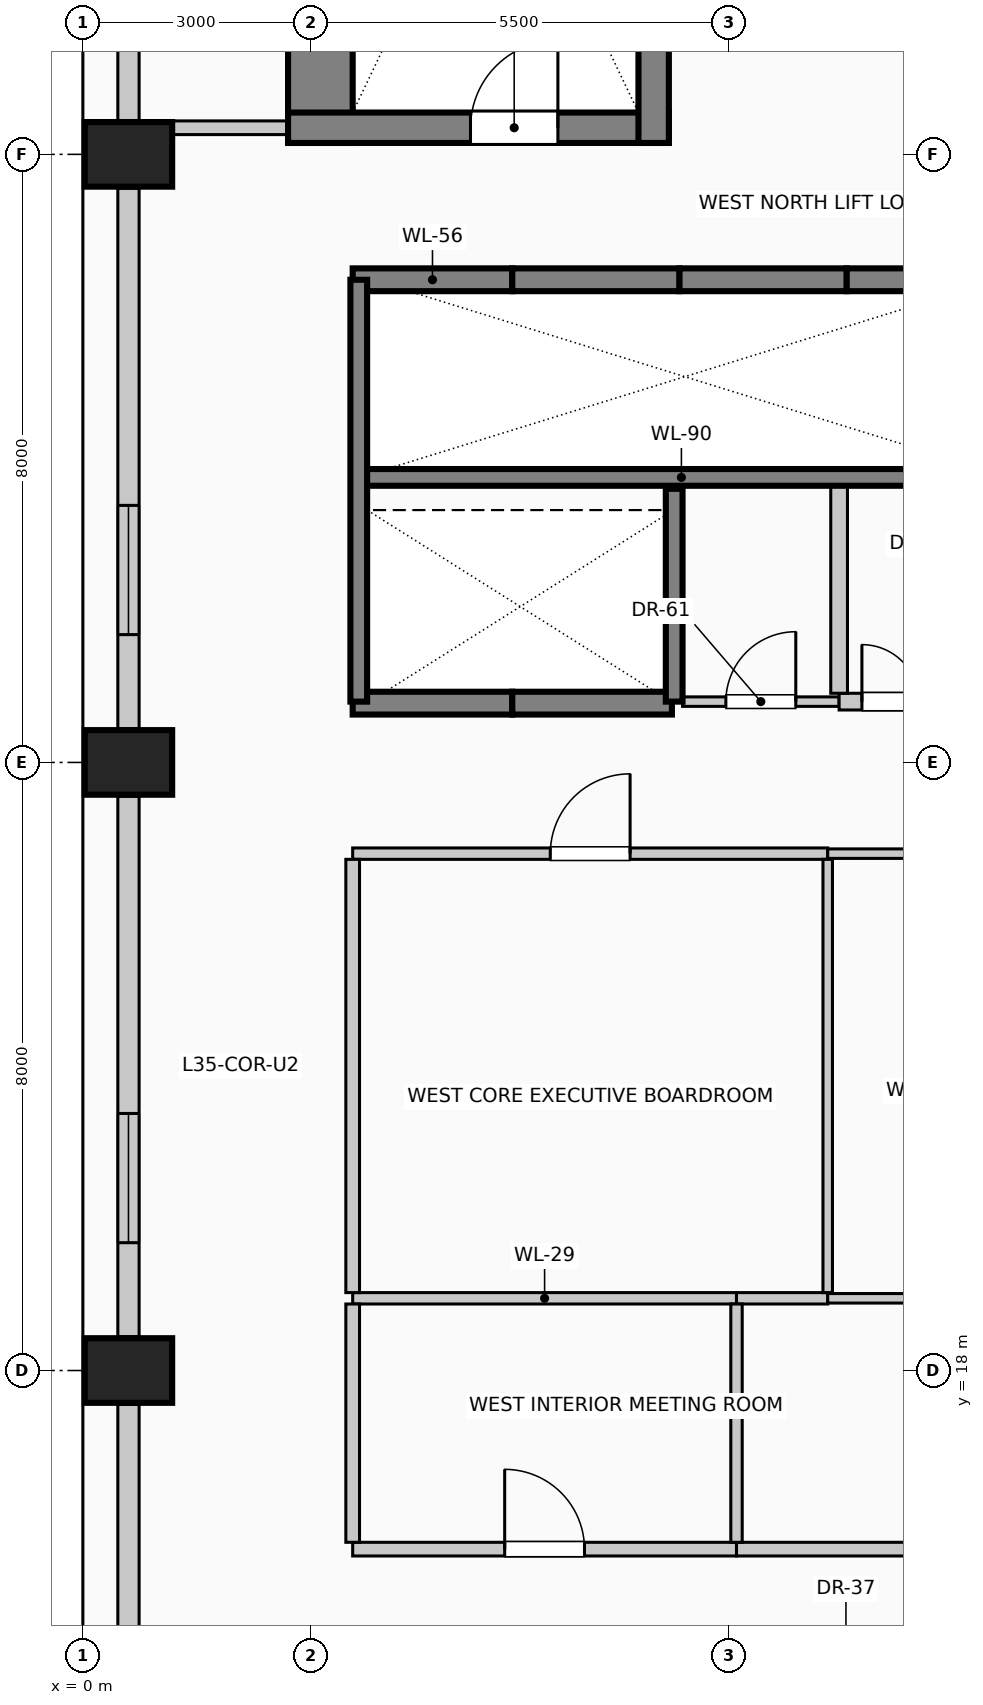
"""IFC4 building model, lengths in metres.
Left out: names, types, materials, properties, quantities, classifications, styles, units other than length and angle.
Written with IfcOpenShell. Run it as: python <this file> out.ifc"""

import sys

from ifc_helpers import new_model, si_unit, direction, frame, frame_2d, origin, origin_2d, place, context, subcontext, project, spatial, rectangle, extrude, element, fill, save


model = new_model("IFC4")
c1 = context("Model", 3, precision=1e-05, world=origin(), true_north=direction((0.0, 1.0)))
c2 = subcontext(c1, "Body", "Model", "MODEL_VIEW")
j1 = project(units=[si_unit("LENGTHUNIT", "METRE"), si_unit("PLANEANGLEUNIT", "RADIAN")], contexts=[c1])
p1 = place(None, origin())
s1 = spatial("IfcSite", under=j1, at=p1, CompositionType="ELEMENT")
p2 = place(p1, origin())
s2 = spatial("IfcBuilding", under=s1, at=p2, CompositionType="ELEMENT")
p3 = place(p2, frame((0.0, 0.0, 144.6)))
s3 = spatial("IfcBuildingStorey", under=s2, at=p3, CompositionType="ELEMENT", Elevation=144.6)
p4 = place(p3, frame((3.125, 34.15, 0.0), z_axis=(0.0, 0.0, 1.0), x_axis=(0.0, 1.0, 0.0)))
e1 = element("IfcWall", 1, at=p4, inside=s3, PredefinedType="SHEAR", context=c2, shape_type="SweptSolid", body=[
    extrude(rectangle(XDim=9.13, YDim=0.85, at=frame_2d((4.565, 0.0))), origin(), (0.0, 0.0, 1.0), 4.0),
])
p5 = place(p3, frame((2.7, 34.35, 0.0), z_axis=(0.0, 0.0, 1.0), x_axis=(1.0, 0.0, 0.0)))
e2 = element("IfcWall", 2, at=p5, inside=s3, PredefinedType="SHEAR", context=c2, shape_type="SweptSolid", body=[
    extrude(rectangle(XDim=5.01, YDim=0.4, at=frame_2d((2.505, 0.0))), origin(), (0.0, 0.0, 1.0), 4.0),
])
p6 = place(p5, frame((2.4, 0.0, 0.0)))
e3 = element("IfcOpeningElement", 3, at=p6, cuts=e2, PredefinedType="OPENING", context=c2, shape_type="SweptSolid", body=[
    extrude(rectangle(XDim=1.15, YDim=2.2, at=frame_2d((0.575, 1.1))), frame((0.0, 0.21, 0.0), z_axis=(0.0, -1.0, 0.0), x_axis=(1.0, 0.0, 0.0)), (0.0, 0.0, 1.0), 0.42),
])
p7 = place(p3, frame((7.51, 34.15, 0.0), z_axis=(0.0, 0.0, 1.0), x_axis=(0.0, 1.0, 0.0)))
e4 = element("IfcWall", 4, at=p7, inside=s3, PredefinedType="SHEAR", context=c2, shape_type="SweptSolid", body=[
    extrude(rectangle(XDim=9.13, YDim=0.4, at=frame_2d((4.565, 0.0))), origin(), (0.0, 0.0, 1.0), 4.0),
])
for number, where, z_axis, x_axis in (
    (5, (0.6, 18.0, 0.0), (0.0, 0.0, 1.0), (0.0, 1.0, 0.0)),
    (6, (0.6, 26.0, 0.0), (0.0, 0.0, 1.0), (0.0, 1.0, 0.0)),
    (7, (0.6, 34.0, 0.0), (0.0, 0.0, 1.0), (0.0, 1.0, 0.0)),
):
    element("IfcColumn", number, at=place(p3, frame(where, z_axis=z_axis, x_axis=x_axis)), inside=s3, PredefinedType="COLUMN", context=c2, shape_type="SweptSolid", body=[
        extrude(rectangle(XDim=0.85, YDim=1.15, at=origin_2d()), origin(), (0.0, 0.0, 1.0), 4.0),
    ])
p8 = place(p3, frame((0.6, 10.445, 0.0), z_axis=(0.0, 0.0, 1.0), x_axis=(0.0, 1.0, 0.0)))
e8 = element("IfcWall", 8, at=p8, inside=s3, PredefinedType="SOLIDWALL", context=c2, shape_type="SweptSolid", body=[
    extrude(rectangle(XDim=7.11, YDim=0.28, at=frame_2d((3.555, 0.0))), origin(), (0.0, 0.0, 1.0), 2.875),
])
p9 = place(p3, frame((0.6, 18.445, 0.0), z_axis=(0.0, 0.0, 1.0), x_axis=(0.0, 1.0, 0.0)))
e9 = element("IfcWall", 9, at=p9, inside=s3, PredefinedType="SOLIDWALL", context=c2, shape_type="SweptSolid", body=[
    extrude(rectangle(XDim=7.11, YDim=0.28, at=frame_2d((3.555, 0.0))), origin(), (0.0, 0.0, 1.0), 2.875),
])
p10 = place(p9, frame((1.237, 0.0, 0.5)))
e10 = element("IfcOpeningElement", 10, at=p10, cuts=e9, PredefinedType="OPENING", context=c2, shape_type="SweptSolid", body=[
    extrude(rectangle(XDim=1.7, YDim=1.95, at=frame_2d((0.85, 0.975))), frame((0.0, 0.15, 0.0), z_axis=(0.0, -1.0, 0.0), x_axis=(1.0, 0.0, 0.0)), (0.0, 0.0, 1.0), 0.3),
])
p11 = place(p3, frame((0.6, 26.445, 0.0), z_axis=(0.0, 0.0, 1.0), x_axis=(0.0, 1.0, 0.0)))
e11 = element("IfcWall", 11, at=p11, inside=s3, PredefinedType="SOLIDWALL", context=c2, shape_type="SweptSolid", body=[
    extrude(rectangle(XDim=7.11, YDim=0.28, at=frame_2d((3.555, 0.0))), origin(), (0.0, 0.0, 1.0), 2.875),
])
p12 = place(p11, frame((1.237, 0.0, 0.5)))
e12 = element("IfcOpeningElement", 12, at=p12, cuts=e11, PredefinedType="OPENING", context=c2, shape_type="SweptSolid", body=[
    extrude(rectangle(XDim=1.7, YDim=1.95, at=frame_2d((0.85, 0.975))), frame((0.0, 0.15, 0.0), z_axis=(0.0, -1.0, 0.0), x_axis=(1.0, 0.0, 0.0)), (0.0, 0.0, 1.0), 0.3),
])
p13 = place(p3, frame((0.6, 34.445, 0.0), z_axis=(0.0, 0.0, 1.0), x_axis=(0.0, 1.0, 0.0)))
e13 = element("IfcWall", 13, at=p13, inside=s3, PredefinedType="SOLIDWALL", context=c2, shape_type="SweptSolid", body=[
    extrude(rectangle(XDim=7.51, YDim=0.28, at=frame_2d((3.755, 0.0))), origin(), (0.0, 0.0, 1.0), 2.875),
])
p14 = place(p3, frame((3.55, 32.35, 0.0), z_axis=(0.0, 0.0, 1.0), x_axis=(1.0, 0.0, 0.0)))
e14 = element("IfcWall", 14, at=p14, inside=s3, PredefinedType="SOLIDWALL", context=c2, shape_type="SweptSolid", body=[
    extrude(rectangle(XDim=2.1, YDim=0.3, at=frame_2d((1.05, 0.0))), origin(), (0.0, 0.0, 1.0), 4.0),
])
p15 = place(p3, frame((5.65, 32.35, 0.0), z_axis=(0.0, 0.0, 1.0), x_axis=(1.0, 0.0, 0.0)))
e15 = element("IfcWall", 15, at=p15, inside=s3, PredefinedType="SOLIDWALL", context=c2, shape_type="SweptSolid", body=[
    extrude(rectangle(XDim=2.2, YDim=0.3, at=frame_2d((1.1, 0.0))), origin(), (0.0, 0.0, 1.0), 4.0),
])
p16 = place(p3, frame((7.85, 32.35, 0.0), z_axis=(0.0, 0.0, 1.0), x_axis=(1.0, 0.0, 0.0)))
e16 = element("IfcWall", 16, at=p16, inside=s3, PredefinedType="SOLIDWALL", context=c2, shape_type="SweptSolid", body=[
    extrude(rectangle(XDim=2.2, YDim=0.3, at=frame_2d((1.1, 0.0))), origin(), (0.0, 0.0, 1.0), 4.0),
])
p17 = place(p3, frame((10.05, 32.35, 0.0), z_axis=(0.0, 0.0, 1.0), x_axis=(1.0, 0.0, 0.0)))
e17 = element("IfcWall", 17, at=p17, inside=s3, PredefinedType="SOLIDWALL", context=c2, shape_type="SweptSolid", body=[
    extrude(rectangle(XDim=2.15, YDim=0.3, at=frame_2d((1.075, 0.0))), origin(), (0.0, 0.0, 1.0), 4.0),
])
p18 = place(p3, frame((5.65, 26.78, 0.0), z_axis=(0.0, 0.0, 1.0), x_axis=(-1.0, 0.0, 0.0)))
e18 = element("IfcWall", 18, at=p18, inside=s3, PredefinedType="SOLIDWALL", context=c2, shape_type="SweptSolid", body=[
    extrude(rectangle(XDim=2.1, YDim=0.3, at=frame_2d((1.05, 0.0))), origin(), (0.0, 0.0, 1.0), 4.0),
])
p19 = place(p3, frame((7.75, 26.78, 0.0), z_axis=(0.0, 0.0, 1.0), x_axis=(-1.0, 0.0, 0.0)))
e19 = element("IfcWall", 19, at=p19, inside=s3, PredefinedType="SOLIDWALL", context=c2, shape_type="SweptSolid", body=[
    extrude(rectangle(XDim=2.1, YDim=0.3, at=frame_2d((1.05, 0.0))), origin(), (0.0, 0.0, 1.0), 4.0),
])
p20 = place(p3, frame((3.55, 29.75, 0.0), z_axis=(0.0, 0.0, 1.0), x_axis=(1.0, 0.0, 0.0)))
e20 = element("IfcWall", 20, at=p20, inside=s3, PredefinedType="SOLIDWALL", context=c2, shape_type="SweptSolid", body=[
    extrude(rectangle(XDim=8.65, YDim=0.22, at=frame_2d((4.325, 0.0))), origin(), (0.0, 0.0, 1.0), 4.0),
])
p21 = place(p3, frame((3.63, 26.8, 0.0), z_axis=(0.0, 0.0, 1.0), x_axis=(0.0, 1.0, 0.0)))
e21 = element("IfcWall", 21, at=p21, inside=s3, PredefinedType="SOLIDWALL", context=c2, shape_type="SweptSolid", body=[
    extrude(rectangle(XDim=5.55, YDim=0.22, at=frame_2d((2.775, 0.0))), origin(), (0.0, 0.0, 1.0), 4.0),
])
p22 = place(p3, frame((7.78, 26.8, 0.0), z_axis=(0.0, 0.0, 1.0), x_axis=(0.0, 1.0, 0.0)))
e22 = element("IfcWall", 22, at=p22, inside=s3, PredefinedType="SOLIDWALL", context=c2, shape_type="SweptSolid", body=[
    extrude(rectangle(XDim=2.8, YDim=0.22, at=frame_2d((1.4, 0.0))), origin(), (0.0, 0.0, 1.0), 4.0),
])
p23 = place(p3, frame((3.55, 15.65, 0.0), z_axis=(0.0, 0.0, 1.0), x_axis=(1.0, 0.0, 0.0)))
e23 = element("IfcWall", 23, at=p23, inside=s3, PredefinedType="PARTITIONING", context=c2, shape_type="SweptSolid", body=[
    extrude(rectangle(XDim=5.05, YDim=0.18, at=frame_2d((2.525, 0.0))), origin(), (0.0, 0.0, 1.0), 3.725),
])
p24 = place(p23, frame((2.0, 0.0, 0.0)))
e24 = element("IfcOpeningElement", 24, at=p24, cuts=e23, PredefinedType="OPENING", context=c2, shape_type="SweptSolid", body=[
    extrude(rectangle(XDim=1.05, YDim=2.15, at=frame_2d((0.525, 1.075))), frame((0.0, 0.1, 0.0), z_axis=(0.0, -1.0, 0.0), x_axis=(1.0, 0.0, 0.0)), (0.0, 0.0, 1.0), 0.2),
])
p25 = place(p3, frame((8.6, 15.65, 0.0), z_axis=(0.0, 0.0, 1.0), x_axis=(1.0, 0.0, 0.0)))
e25 = element("IfcWall", 25, at=p25, inside=s3, PredefinedType="PARTITIONING", context=c2, shape_type="SweptSolid", body=[
    extrude(rectangle(XDim=7.25, YDim=0.18, at=frame_2d((3.625, 0.0))), origin(), (0.0, 0.0, 1.0), 3.725),
])
p26 = place(p25, frame((3.15, 0.0, 0.0)))
e26 = element("IfcOpeningElement", 26, at=p26, cuts=e25, PredefinedType="OPENING", context=c2, shape_type="SweptSolid", body=[
    extrude(rectangle(XDim=0.95, YDim=2.15, at=frame_2d((0.475, 1.075))), frame((0.0, 0.1, 0.0), z_axis=(0.0, -1.0, 0.0), x_axis=(1.0, 0.0, 0.0)), (0.0, 0.0, 1.0), 0.2),
])
p27 = place(p3, frame((3.55, 18.95, 0.0), z_axis=(0.0, 0.0, 1.0), x_axis=(1.0, 0.0, 0.0)))
e27 = element("IfcWall", 27, at=p27, inside=s3, PredefinedType="PARTITIONING", context=c2, shape_type="SweptSolid", body=[
    extrude(rectangle(XDim=5.05, YDim=0.15, at=frame_2d((2.525, 0.0))), origin(), (0.0, 0.0, 1.0), 3.725),
])
p28 = place(p3, frame((8.6, 18.95, 0.0), z_axis=(0.0, 0.0, 1.0), x_axis=(1.0, 0.0, 0.0)))
e28 = element("IfcWall", 28, at=p28, inside=s3, PredefinedType="PARTITIONING", context=c2, shape_type="SweptSolid", body=[
    extrude(rectangle(XDim=1.2, YDim=0.15, at=frame_2d((0.6, 0.0))), origin(), (0.0, 0.0, 1.0), 3.725),
])
p29 = place(p3, frame((9.8, 18.95, 0.0), z_axis=(0.0, 0.0, 1.0), x_axis=(1.0, 0.0, 0.0)))
e29 = element("IfcWall", 29, at=p29, inside=s3, PredefinedType="PARTITIONING", context=c2, shape_type="SweptSolid", body=[
    extrude(rectangle(XDim=6.05, YDim=0.125, at=frame_2d((3.025, 0.0))), origin(), (0.0, 0.0, 1.0), 3.725),
])
p30 = place(p3, frame((3.55, 24.8, 0.0), z_axis=(0.0, 0.0, 1.0), x_axis=(1.0, 0.0, 0.0)))
e30 = element("IfcWall", 30, at=p30, inside=s3, PredefinedType="PARTITIONING", context=c2, shape_type="SweptSolid", body=[
    extrude(rectangle(XDim=6.25, YDim=0.15, at=frame_2d((3.125, 0.0))), origin(), (0.0, 0.0, 1.0), 3.725),
])
p31 = place(p30, frame((2.6, 0.0, 0.0)))
e31 = element("IfcOpeningElement", 31, at=p31, cuts=e30, PredefinedType="OPENING", context=c2, shape_type="SweptSolid", body=[
    extrude(rectangle(XDim=1.05, YDim=2.15, at=frame_2d((0.525, 1.075))), frame((0.0, 0.085, 0.0), z_axis=(0.0, -1.0, 0.0), x_axis=(1.0, 0.0, 0.0)), (0.0, 0.0, 1.0), 0.17),
])
p32 = place(p3, frame((9.8, 24.8, 0.0), z_axis=(0.0, 0.0, 1.0), x_axis=(1.0, 0.0, 0.0)))
e32 = element("IfcWall", 32, at=p32, inside=s3, PredefinedType="PARTITIONING", context=c2, shape_type="SweptSolid", body=[
    extrude(rectangle(XDim=6.05, YDim=0.125, at=frame_2d((3.025, 0.0))), origin(), (0.0, 0.0, 1.0), 3.725),
])
p33 = place(p32, frame((2.575, 0.0, 0.0)))
e33 = element("IfcOpeningElement", 33, at=p33, cuts=e32, PredefinedType="OPENING", context=c2, shape_type="SweptSolid", body=[
    extrude(rectangle(XDim=0.9, YDim=2.1, at=frame_2d((0.45, 1.05))), frame((0.0, 0.073, 0.0), z_axis=(0.0, -1.0, 0.0), x_axis=(1.0, 0.0, 0.0)), (0.0, 0.0, 1.0), 0.145),
])
p34 = place(p3, frame((7.89, 26.8, 0.0), z_axis=(0.0, 0.0, 1.0), x_axis=(1.0, 0.0, 0.0)))
e34 = element("IfcWall", 34, at=p34, inside=s3, PredefinedType="PARTITIONING", context=c2, shape_type="SweptSolid", body=[
    extrude(rectangle(XDim=2.06, YDim=0.125, at=frame_2d((1.03, 0.0))), origin(), (0.0, 0.0, 1.0), 3.725),
])
p35 = place(p34, frame((0.57, 0.0, 0.0)))
e35 = element("IfcOpeningElement", 35, at=p35, cuts=e34, PredefinedType="OPENING", context=c2, shape_type="SweptSolid", body=[
    extrude(rectangle(XDim=0.92, YDim=2.1, at=frame_2d((0.46, 1.05))), frame((0.0, 0.073, 0.0), z_axis=(0.0, -1.0, 0.0), x_axis=(1.0, 0.0, 0.0)), (0.0, 0.0, 1.0), 0.145),
])
p36 = place(p3, frame((9.95, 26.8, 0.0), z_axis=(0.0, 0.0, 1.0), x_axis=(1.0, 0.0, 0.0)))
e36 = element("IfcWall", 36, at=p36, inside=s3, PredefinedType="PARTITIONING", context=c2, shape_type="SweptSolid", body=[
    extrude(rectangle(XDim=2.1, YDim=0.22, at=frame_2d((1.05, 0.0))), origin(), (0.0, 0.0, 1.0), 3.725),
])
p37 = place(p36, frame((0.3, 0.0, 0.0)))
e37 = element("IfcOpeningElement", 37, at=p37, cuts=e36, PredefinedType="OPENING", context=c2, shape_type="SweptSolid", body=[
    extrude(rectangle(XDim=1.5, YDim=2.25, at=frame_2d((0.75, 1.125))), frame((0.0, 0.12, 0.0), z_axis=(0.0, -1.0, 0.0), x_axis=(1.0, 0.0, 0.0)), (0.0, 0.0, 1.0), 0.24),
])
p38 = place(p3, frame((1.175, 34.35, 0.0), z_axis=(0.0, 0.0, 1.0), x_axis=(1.0, 0.0, 0.0)))
e38 = element("IfcWall", 38, at=p38, inside=s3, PredefinedType="PARTITIONING", context=c2, shape_type="SweptSolid", body=[
    extrude(rectangle(XDim=1.525, YDim=0.18, at=frame_2d((0.762, 0.0))), origin(), (0.0, 0.0, 1.0), 3.725),
])
p39 = place(p3, frame((3.55, 15.74, 0.0), z_axis=(0.0, 0.0, 1.0), x_axis=(0.0, 1.0, 0.0)))
e39 = element("IfcWall", 39, at=p39, inside=s3, PredefinedType="PARTITIONING", context=c2, shape_type="SweptSolid", body=[
    extrude(rectangle(XDim=3.135, YDim=0.18, at=frame_2d((1.567, 0.0))), origin(), (0.0, 0.0, 1.0), 3.725),
])
p40 = place(p3, frame((3.55, 19.025, 0.0), z_axis=(0.0, 0.0, 1.0), x_axis=(0.0, 1.0, 0.0)))
e40 = element("IfcWall", 40, at=p40, inside=s3, PredefinedType="PARTITIONING", context=c2, shape_type="SweptSolid", body=[
    extrude(rectangle(XDim=5.7, YDim=0.18, at=frame_2d((2.85, 0.0))), origin(), (0.0, 0.0, 1.0), 3.725),
])
p41 = place(p3, frame((8.6, 15.74, 0.0), z_axis=(0.0, 0.0, 1.0), x_axis=(0.0, 1.0, 0.0)))
e41 = element("IfcWall", 41, at=p41, inside=s3, PredefinedType="PARTITIONING", context=c2, shape_type="SweptSolid", body=[
    extrude(rectangle(XDim=3.135, YDim=0.15, at=frame_2d((1.567, 0.0))), origin(), (0.0, 0.0, 1.0), 3.725),
])
p42 = place(p3, frame((9.8, 19.025, 0.0), z_axis=(0.0, 0.0, 1.0), x_axis=(0.0, 1.0, 0.0)))
e42 = element("IfcWall", 42, at=p42, inside=s3, PredefinedType="PARTITIONING", context=c2, shape_type="SweptSolid", body=[
    extrude(rectangle(XDim=5.7, YDim=0.125, at=frame_2d((2.85, 0.0))), origin(), (0.0, 0.0, 1.0), 3.725),
])
p43 = place(p3, frame((9.95, 26.91, 0.0), z_axis=(0.0, 0.0, 1.0), x_axis=(0.0, 1.0, 0.0)))
e43 = element("IfcWall", 43, at=p43, inside=s3, PredefinedType="PARTITIONING", context=c2, shape_type="SweptSolid", body=[
    extrude(rectangle(XDim=2.73, YDim=0.22, at=frame_2d((1.365, 0.0))), origin(), (0.0, 0.0, 1.0), 3.725),
])
p44 = place(p10, origin())
e44 = element("IfcWindow", 44, at=p44, inside=s3, PartitioningType="SINGLE_PANEL", PredefinedType="WINDOW", context=c2, shape_type="SweptSolid", body=[
    extrude(rectangle(XDim=1.7, YDim=1.95, at=frame_2d((0.85, 0.975))), frame((0.0, 0.03, 0.0), z_axis=(0.0, -1.0, 0.0), x_axis=(1.0, 0.0, 0.0)), (0.0, 0.0, 1.0), 0.06),
])
fill(e10, e44)
p45 = place(p12, origin())
e45 = element("IfcWindow", 45, at=p45, inside=s3, PartitioningType="SINGLE_PANEL", PredefinedType="WINDOW", context=c2, shape_type="SweptSolid", body=[
    extrude(rectangle(XDim=1.7, YDim=1.95, at=frame_2d((0.85, 0.975))), frame((0.0, 0.03, 0.0), z_axis=(0.0, -1.0, 0.0), x_axis=(1.0, 0.0, 0.0)), (0.0, 0.0, 1.0), 0.06),
])
fill(e12, e45)
p46 = place(p6, origin())
e46 = element("IfcDoor", 46, at=p46, inside=s3, OperationType="SINGLE_SWING_RIGHT", PredefinedType="DOOR", context=c2, shape_type="SweptSolid", body=[
    extrude(rectangle(XDim=1.15, YDim=2.2, at=frame_2d((0.575, 1.1))), frame((0.0, 0.025, 0.0), z_axis=(0.0, -1.0, 0.0), x_axis=(1.0, 0.0, 0.0)), (0.0, 0.0, 1.0), 0.05),
])
fill(e3, e46)
p47 = place(p24, origin())
e47 = element("IfcDoor", 47, at=p47, inside=s3, OperationType="SINGLE_SWING_LEFT", PredefinedType="DOOR", context=c2, shape_type="SweptSolid", body=[
    extrude(rectangle(XDim=1.05, YDim=2.15, at=frame_2d((0.525, 1.075))), frame((0.0, 0.025, 0.0), z_axis=(0.0, -1.0, 0.0), x_axis=(1.0, 0.0, 0.0)), (0.0, 0.0, 1.0), 0.05),
])
fill(e24, e47)
p48 = place(p31, origin())
e48 = element("IfcDoor", 48, at=p48, inside=s3, OperationType="SINGLE_SWING_RIGHT", PredefinedType="DOOR", context=c2, shape_type="SweptSolid", body=[
    extrude(rectangle(XDim=1.05, YDim=2.15, at=frame_2d((0.525, 1.075))), frame((0.0, 0.025, 0.0), z_axis=(0.0, -1.0, 0.0), x_axis=(1.0, 0.0, 0.0)), (0.0, 0.0, 1.0), 0.05),
])
fill(e31, e48)
p49 = place(p35, origin())
e49 = element("IfcDoor", 49, at=p49, inside=s3, OperationType="SINGLE_SWING_RIGHT", PredefinedType="DOOR", context=c2, shape_type="SweptSolid", body=[
    extrude(rectangle(XDim=0.92, YDim=2.1, at=frame_2d((0.46, 1.05))), frame((0.0, 0.025, 0.0), z_axis=(0.0, -1.0, 0.0), x_axis=(1.0, 0.0, 0.0)), (0.0, 0.0, 1.0), 0.05),
])
fill(e35, e49)
p50 = place(p37, origin())
e50 = element("IfcDoor", 50, at=p50, inside=s3, OperationType="DOUBLE_DOOR_SINGLE_SWING", PredefinedType="DOOR", context=c2, shape_type="SweptSolid", body=[
    extrude(rectangle(XDim=1.5, YDim=2.25, at=frame_2d((0.75, 1.125))), frame((0.0, 0.025, 0.0), z_axis=(0.0, -1.0, 0.0), x_axis=(1.0, 0.0, 0.0)), (0.0, 0.0, 1.0), 0.05),
])
fill(e37, e50)
save(model, sys.argv[1])
